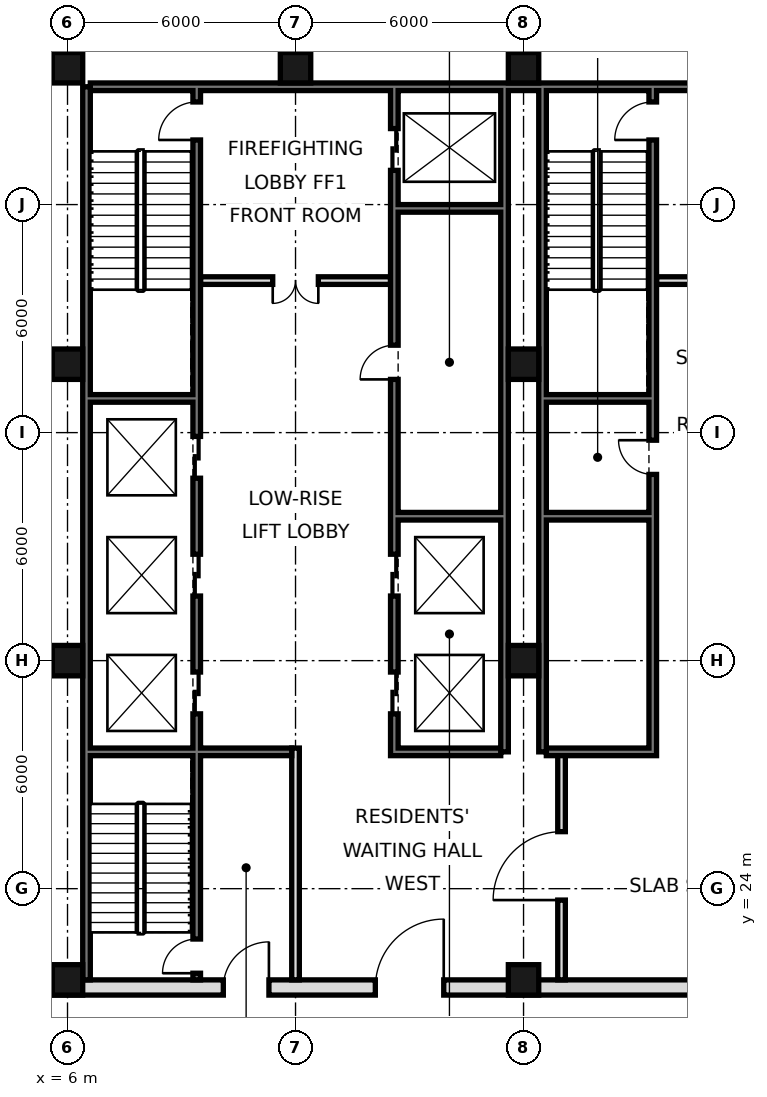
"""IFC4 building model, lengths in metres.
Left out: names, types, materials, properties, quantities, classifications, styles, units other than length and angle.
Written with IfcOpenShell. Run it as: python <this file> out.ifc"""

import sys

from ifc_helpers import new_model, si_unit, direction, frame, frame_2d, origin, origin_2d, place, context, subcontext, project, spatial, rectangle, hollow_rectangle, extrude, element, fill, save


model = new_model("IFC4")
c1 = context("Model", 3, precision=1e-05, world=origin(), true_north=direction((0.0, 1.0)))
c2 = subcontext(c1, "Body", "Model", "MODEL_VIEW")
j1 = project(units=[si_unit("LENGTHUNIT", "METRE"), si_unit("PLANEANGLEUNIT", "RADIAN")], contexts=[c1])
p1 = place(None, origin())
s1 = spatial("IfcSite", under=j1, at=p1, CompositionType="ELEMENT")
p2 = place(p1, origin())
s2 = spatial("IfcBuilding", under=s1, at=p2, CompositionType="ELEMENT")
p3 = place(p2, frame((0.0, 0.0, 25.2)))
s3 = spatial("IfcBuildingStorey", under=s2, at=p3, CompositionType="ELEMENT", Elevation=25.2)
for number, where, z_axis, x_axis in (
    (1, (6.0, 21.6, 0.0), (0.0, 0.0, 1.0), (1.0, 0.0, 0.0)),
    (2, (6.0, 30.0, 0.0), (0.0, 0.0, 1.0), (1.0, 0.0, 0.0)),
    (3, (6.0, 37.8, 0.0), (0.0, 0.0, 1.0), (1.0, 0.0, 0.0)),
    (4, (6.0, 45.6, 0.0), (0.0, 0.0, 1.0), (1.0, 0.0, 0.0)),
    (5, (12.0, 45.6, 0.0), (0.0, 0.0, 1.0), (1.0, 0.0, 0.0)),
    (6, (18.0, 21.6, 0.0), (0.0, 0.0, 1.0), (1.0, 0.0, 0.0)),
    (7, (18.0, 30.0, 0.0), (0.0, 0.0, 1.0), (1.0, 0.0, 0.0)),
    (8, (18.0, 37.8, 0.0), (0.0, 0.0, 1.0), (1.0, 0.0, 0.0)),
    (9, (18.0, 45.6, 0.0), (0.0, 0.0, 1.0), (1.0, 0.0, 0.0)),
):
    element("IfcColumn", number, at=place(p3, frame(where, z_axis=z_axis, x_axis=x_axis)), inside=s3, PredefinedType="COLUMN", context=c2, shape_type="SweptSolid", body=[
        extrude(hollow_rectangle(XDim=0.8, YDim=0.8, WallThickness=0.07, at=origin_2d()), origin(), (0.0, 0.0, 1.0), 4.8),
    ])
p4 = place(p3, frame((6.5, 21.6, 0.0), z_axis=(0.0, 0.0, 1.0), x_axis=(0.0, 1.0, 0.0)))
e10 = element("IfcWall", 10, at=p4, inside=s3, PredefinedType="SOLIDWALL", context=c2, shape_type="SweptSolid", body=[
    extrude(rectangle(XDim=23.5, YDim=0.2, at=frame_2d((11.75, 0.0))), origin(), (0.0, 0.0, 1.0), 4.4),
])
p5 = place(p3, frame((6.6, 45.1, 0.0), z_axis=(0.0, 0.0, 1.0), x_axis=(1.0, 0.0, 0.0)))
e11 = element("IfcWall", 11, at=p5, inside=s3, PredefinedType="SOLIDWALL", context=c2, shape_type="SweptSolid", body=[
    extrude(rectangle(XDim=34.8, YDim=0.2, at=frame_2d((17.4, 0.0))), origin(), (0.0, 0.0, 1.0), 4.4),
])
for number, where, z_axis, x_axis in (
    (12, (17.5, 27.6, 0.0), (0.0, 0.0, 1.0), (0.0, 1.0, 0.0)),
    (13, (18.5, 27.6, 0.0), (0.0, 0.0, 1.0), (0.0, 1.0, 0.0)),
):
    element("IfcWall", number, at=place(p3, frame(where, z_axis=z_axis, x_axis=x_axis)), inside=s3, PredefinedType="SOLIDWALL", context=c2, shape_type="SweptSolid", body=[
        extrude(rectangle(XDim=17.5, YDim=0.2, at=frame_2d((8.75, 0.0))), origin(), (0.0, 0.0, 1.0), 4.4),
    ])
p6 = place(p3, frame((5.6, 21.4, 0.0), z_axis=(0.0, 0.0, 1.0), x_axis=(1.0, 0.0, 0.0)))
e14 = element("IfcWall", 14, at=p6, inside=s3, PredefinedType="SOLIDWALL", context=c2, shape_type="SweptSolid", body=[
    extrude(rectangle(XDim=36.8, YDim=0.4, at=frame_2d((18.4, 0.0))), origin(), (0.0, 0.0, 1.0), 4.4),
])
p7 = place(p6, frame((8.5, 0.0, 0.0)))
e15 = element("IfcOpeningElement", 15, at=p7, cuts=e14, PredefinedType="OPENING", context=c2, shape_type="SweptSolid", body=[
    extrude(rectangle(XDim=1.8, YDim=2.1, at=frame_2d((0.9, 1.05))), frame((0.0, 0.21, 0.0), z_axis=(0.0, -1.0, 0.0), x_axis=(1.0, 0.0, 0.0)), (0.0, 0.0, 1.0), 0.42),
])
p8 = place(p6, frame((17.5, 0.0, 0.0)))
e16 = element("IfcOpeningElement", 16, at=p8, cuts=e14, PredefinedType="OPENING", context=c2, shape_type="SweptSolid", body=[
    extrude(rectangle(XDim=1.8, YDim=2.1, at=frame_2d((0.9, 1.05))), frame((0.0, 0.21, 0.0), z_axis=(0.0, -1.0, 0.0), x_axis=(1.0, 0.0, 0.0)), (0.0, 0.0, 1.0), 0.42),
])
p9 = place(p6, frame((26.5, 0.0, 0.0)))
e17 = element("IfcOpeningElement", 17, at=p9, cuts=e14, PredefinedType="OPENING", context=c2, shape_type="SweptSolid", body=[
    extrude(rectangle(XDim=1.8, YDim=2.1, at=frame_2d((0.9, 1.05))), frame((0.0, 0.21, 0.0), z_axis=(0.0, -1.0, 0.0), x_axis=(1.0, 0.0, 0.0)), (0.0, 0.0, 1.0), 0.42),
])
p10 = place(p6, frame((4.5, 0.0, 0.0)))
e18 = element("IfcOpeningElement", 18, at=p10, cuts=e14, PredefinedType="OPENING", context=c2, shape_type="SweptSolid", body=[
    extrude(rectangle(XDim=1.2, YDim=2.1, at=frame_2d((0.6, 1.05))), frame((0.0, 0.21, 0.0), z_axis=(0.0, -1.0, 0.0), x_axis=(1.0, 0.0, 0.0)), (0.0, 0.0, 1.0), 0.42),
])
p11 = place(p6, frame((31.1, 0.0, 0.0)))
e19 = element("IfcOpeningElement", 19, at=p11, cuts=e14, PredefinedType="OPENING", context=c2, shape_type="SweptSolid", body=[
    extrude(rectangle(XDim=1.2, YDim=2.1, at=frame_2d((0.6, 1.05))), frame((0.0, 0.21, 0.0), z_axis=(0.0, -1.0, 0.0), x_axis=(1.0, 0.0, 0.0)), (0.0, 0.0, 1.0), 0.42),
])
p12 = place(p3, frame((19.0, 21.6, 0.0), z_axis=(0.0, 0.0, 1.0), x_axis=(0.0, 1.0, 0.0)))
e20 = element("IfcWall", 20, at=p12, inside=s3, PredefinedType="PARTITIONING", context=c2, shape_type="SweptSolid", body=[
    extrude(rectangle(XDim=6.0, YDim=0.2, at=frame_2d((3.0, 0.0))), origin(), (0.0, 0.0, 1.0), 4.4),
])
p13 = place(p12, frame((2.1, 0.0, 0.0)))
e21 = element("IfcOpeningElement", 21, at=p13, cuts=e20, PredefinedType="OPENING", context=c2, shape_type="SweptSolid", body=[
    extrude(rectangle(XDim=1.8, YDim=2.1, at=frame_2d((0.9, 1.05))), frame((0.0, 0.11, 0.0), z_axis=(0.0, -1.0, 0.0), x_axis=(1.0, 0.0, 0.0)), (0.0, 0.0, 1.0), 0.22),
])
p14 = place(p3, frame((12.0, 21.6, 0.0), z_axis=(0.0, 0.0, 1.0), x_axis=(0.0, 1.0, 0.0)))
e22 = element("IfcWall", 22, at=p14, inside=s3, PredefinedType="PARTITIONING", context=c2, shape_type="SweptSolid", body=[
    extrude(rectangle(XDim=6.1, YDim=0.2, at=frame_2d((3.05, 0.0))), origin(), (0.0, 0.0, 1.0), 4.4),
])
p15 = place(p3, frame((14.6, 27.5, 0.0), z_axis=(0.0, 0.0, 1.0), x_axis=(0.0, 1.0, 0.0)))
e23 = element("IfcWall", 23, at=p15, inside=s3, PredefinedType="SOLIDWALL", context=c2, shape_type="SweptSolid", body=[
    extrude(rectangle(XDim=17.5, YDim=0.2, at=frame_2d((8.75, 0.0))), origin(), (0.0, 0.0, 1.0), 4.4),
])
p16 = place(p15, frame((1.1, 0.0, 0.0)))
e24 = element("IfcOpeningElement", 24, at=p16, cuts=e23, PredefinedType="OPENING", context=c2, shape_type="SweptSolid", body=[
    extrude(rectangle(XDim=1.1, YDim=2.1, at=frame_2d((0.55, 1.05))), frame((0.0, 0.11, 0.0), z_axis=(0.0, -1.0, 0.0), x_axis=(1.0, 0.0, 0.0)), (0.0, 0.0, 1.0), 0.22),
])
p17 = place(p15, frame((4.2, 0.0, 0.0)))
e25 = element("IfcOpeningElement", 25, at=p17, cuts=e23, PredefinedType="OPENING", context=c2, shape_type="SweptSolid", body=[
    extrude(rectangle(XDim=1.1, YDim=2.1, at=frame_2d((0.55, 1.05))), frame((0.0, 0.11, 0.0), z_axis=(0.0, -1.0, 0.0), x_axis=(1.0, 0.0, 0.0)), (0.0, 0.0, 1.0), 0.22),
])
p18 = place(p15, frame((15.4, 0.0, 0.0)))
e26 = element("IfcOpeningElement", 26, at=p18, cuts=e23, PredefinedType="OPENING", context=c2, shape_type="SweptSolid", body=[
    extrude(rectangle(XDim=1.1, YDim=2.1, at=frame_2d((0.55, 1.05))), frame((0.0, 0.11, 0.0), z_axis=(0.0, -1.0, 0.0), x_axis=(1.0, 0.0, 0.0)), (0.0, 0.0, 1.0), 0.22),
])
p19 = place(p15, frame((9.9, 0.0, 0.0)))
e27 = element("IfcOpeningElement", 27, at=p19, cuts=e23, PredefinedType="OPENING", context=c2, shape_type="SweptSolid", body=[
    extrude(rectangle(XDim=0.9, YDim=2.1, at=frame_2d((0.45, 1.05))), frame((0.0, 0.11, 0.0), z_axis=(0.0, -1.0, 0.0), x_axis=(1.0, 0.0, 0.0)), (0.0, 0.0, 1.0), 0.22),
])
p20 = place(p3, frame((21.4, 27.5, 0.0), z_axis=(0.0, 0.0, 1.0), x_axis=(0.0, 1.0, 0.0)))
e28 = element("IfcWall", 28, at=p20, inside=s3, PredefinedType="SOLIDWALL", context=c2, shape_type="SweptSolid", body=[
    extrude(rectangle(XDim=17.5, YDim=0.2, at=frame_2d((8.75, 0.0))), origin(), (0.0, 0.0, 1.0), 4.4),
])
p21 = place(p20, frame((16.2, 0.0, 0.0)))
e29 = element("IfcOpeningElement", 29, at=p21, cuts=e28, PredefinedType="OPENING", context=c2, shape_type="SweptSolid", body=[
    extrude(rectangle(XDim=1.0, YDim=2.1, at=frame_2d((0.5, 1.05))), frame((0.0, 0.11, 0.0), z_axis=(0.0, -1.0, 0.0), x_axis=(1.0, 0.0, 0.0)), (0.0, 0.0, 1.0), 0.22),
])
p22 = place(p20, frame((7.4, 0.0, 0.0)))
e30 = element("IfcOpeningElement", 30, at=p22, cuts=e28, PredefinedType="OPENING", context=c2, shape_type="SweptSolid", body=[
    extrude(rectangle(XDim=0.9, YDim=2.1, at=frame_2d((0.45, 1.05))), frame((0.0, 0.11, 0.0), z_axis=(0.0, -1.0, 0.0), x_axis=(1.0, 0.0, 0.0)), (0.0, 0.0, 1.0), 0.22),
])
p23 = place(p3, frame((9.4, 21.6, 0.0), z_axis=(0.0, 0.0, 1.0), x_axis=(0.0, 1.0, 0.0)))
e31 = element("IfcWall", 31, at=p23, inside=s3, PredefinedType="SOLIDWALL", context=c2, shape_type="SweptSolid", body=[
    extrude(rectangle(XDim=23.4, YDim=0.2, at=frame_2d((11.7, 0.0))), origin(), (0.0, 0.0, 1.0), 4.4),
])
p24 = place(p23, frame((7.0, 0.0, 0.0)))
e32 = element("IfcOpeningElement", 32, at=p24, cuts=e31, PredefinedType="OPENING", context=c2, shape_type="SweptSolid", body=[
    extrude(rectangle(XDim=1.1, YDim=2.1, at=frame_2d((0.55, 1.05))), frame((0.0, 0.11, 0.0), z_axis=(0.0, -1.0, 0.0), x_axis=(1.0, 0.0, 0.0)), (0.0, 0.0, 1.0), 0.22),
])
p25 = place(p23, frame((10.1, 0.0, 0.0)))
e33 = element("IfcOpeningElement", 33, at=p25, cuts=e31, PredefinedType="OPENING", context=c2, shape_type="SweptSolid", body=[
    extrude(rectangle(XDim=1.1, YDim=2.1, at=frame_2d((0.55, 1.05))), frame((0.0, 0.11, 0.0), z_axis=(0.0, -1.0, 0.0), x_axis=(1.0, 0.0, 0.0)), (0.0, 0.0, 1.0), 0.22),
])
p26 = place(p23, frame((13.2, 0.0, 0.0)))
e34 = element("IfcOpeningElement", 34, at=p26, cuts=e31, PredefinedType="OPENING", context=c2, shape_type="SweptSolid", body=[
    extrude(rectangle(XDim=1.1, YDim=2.1, at=frame_2d((0.55, 1.05))), frame((0.0, 0.11, 0.0), z_axis=(0.0, -1.0, 0.0), x_axis=(1.0, 0.0, 0.0)), (0.0, 0.0, 1.0), 0.22),
])
p27 = place(p23, frame((22.1, 0.0, 0.0)))
e35 = element("IfcOpeningElement", 35, at=p27, cuts=e31, PredefinedType="OPENING", context=c2, shape_type="SweptSolid", body=[
    extrude(rectangle(XDim=1.0, YDim=2.1, at=frame_2d((0.5, 1.05))), frame((0.0, 0.11, 0.0), z_axis=(0.0, -1.0, 0.0), x_axis=(1.0, 0.0, 0.0)), (0.0, 0.0, 1.0), 0.22),
])
p28 = place(p23, frame((0.175, 0.0, 0.0)))
e36 = element("IfcOpeningElement", 36, at=p28, cuts=e31, PredefinedType="OPENING", context=c2, shape_type="SweptSolid", body=[
    extrude(rectangle(XDim=0.9, YDim=2.1, at=frame_2d((0.45, 1.05))), frame((0.0, 0.11, 0.0), z_axis=(0.0, -1.0, 0.0), x_axis=(1.0, 0.0, 0.0)), (0.0, 0.0, 1.0), 0.22),
])
for number, where, z_axis, x_axis in (
    (37, (14.7, 27.6, 0.0), (0.0, 0.0, 1.0), (1.0, 0.0, 0.0)),
    (38, (18.6, 27.6, 0.0), (0.0, 0.0, 1.0), (1.0, 0.0, 0.0)),
):
    element("IfcWall", number, at=place(p3, frame(where, z_axis=z_axis, x_axis=x_axis)), inside=s3, PredefinedType="SOLIDWALL", context=c2, shape_type="SweptSolid", body=[
        extrude(rectangle(XDim=2.7, YDim=0.2, at=frame_2d((1.35, 0.0))), origin(), (0.0, 0.0, 1.0), 4.4),
    ])
p29 = place(p3, frame((6.6, 27.6, 0.0), z_axis=(0.0, 0.0, 1.0), x_axis=(1.0, 0.0, 0.0)))
e39 = element("IfcWall", 39, at=p29, inside=s3, PredefinedType="SOLIDWALL", context=c2, shape_type="SweptSolid", body=[
    extrude(rectangle(XDim=5.3, YDim=0.2, at=frame_2d((2.65, 0.0))), origin(), (0.0, 0.0, 1.0), 4.4),
])
for number, where, z_axis, x_axis in (
    (40, (14.7, 33.8, 0.0), (0.0, 0.0, 1.0), (1.0, 0.0, 0.0)),
    (41, (18.6, 33.8, 0.0), (0.0, 0.0, 1.0), (1.0, 0.0, 0.0)),
    (42, (18.6, 36.9, 0.0), (0.0, 0.0, 1.0), (1.0, 0.0, 0.0)),
    (43, (6.6, 36.9, 0.0), (0.0, 0.0, 1.0), (1.0, 0.0, 0.0)),
):
    element("IfcWall", number, at=place(p3, frame(where, z_axis=z_axis, x_axis=x_axis)), inside=s3, PredefinedType="SOLIDWALL", context=c2, shape_type="SweptSolid", body=[
        extrude(rectangle(XDim=2.7, YDim=0.2, at=frame_2d((1.35, 0.0))), origin(), (0.0, 0.0, 1.0), 4.4),
    ])
p30 = place(p3, frame((21.5, 40.0, 0.0), z_axis=(0.0, 0.0, 1.0), x_axis=(1.0, 0.0, 0.0)))
e44 = element("IfcWall", 44, at=p30, inside=s3, PredefinedType="PARTITIONING", context=c2, shape_type="SweptSolid", body=[
    extrude(rectangle(XDim=5.0, YDim=0.2, at=frame_2d((2.5, 0.0))), origin(), (0.0, 0.0, 1.0), 4.4),
])
p31 = place(p30, frame((1.9, 0.0, 0.0)))
e45 = element("IfcOpeningElement", 45, at=p31, cuts=e44, PredefinedType="OPENING", context=c2, shape_type="SweptSolid", body=[
    extrude(rectangle(XDim=1.2, YDim=2.1, at=frame_2d((0.6, 1.05))), frame((0.0, 0.11, 0.0), z_axis=(0.0, -1.0, 0.0), x_axis=(1.0, 0.0, 0.0)), (0.0, 0.0, 1.0), 0.22),
])
p32 = place(p3, frame((9.5, 40.0, 0.0), z_axis=(0.0, 0.0, 1.0), x_axis=(1.0, 0.0, 0.0)))
e46 = element("IfcWall", 46, at=p32, inside=s3, PredefinedType="PARTITIONING", context=c2, shape_type="SweptSolid", body=[
    extrude(rectangle(XDim=5.0, YDim=0.2, at=frame_2d((2.5, 0.0))), origin(), (0.0, 0.0, 1.0), 4.4),
])
p33 = place(p32, frame((1.9, 0.0, 0.0)))
e47 = element("IfcOpeningElement", 47, at=p33, cuts=e46, PredefinedType="OPENING", context=c2, shape_type="SweptSolid", body=[
    extrude(rectangle(XDim=1.2, YDim=2.1, at=frame_2d((0.6, 1.05))), frame((0.0, 0.11, 0.0), z_axis=(0.0, -1.0, 0.0), x_axis=(1.0, 0.0, 0.0)), (0.0, 0.0, 1.0), 0.22),
])
p34 = place(p3, frame((14.7, 41.9, 0.0), z_axis=(0.0, 0.0, 1.0), x_axis=(1.0, 0.0, 0.0)))
e48 = element("IfcWall", 48, at=p34, inside=s3, PredefinedType="SOLIDWALL", context=c2, shape_type="SweptSolid", body=[
    extrude(rectangle(XDim=2.7, YDim=0.2, at=frame_2d((1.35, 0.0))), origin(), (0.0, 0.0, 1.0), 4.4),
])
p35 = place(p7, frame((1.8, 0.0, 0.0), z_axis=(0.0, 0.0, 1.0), x_axis=(-1.0, 0.0, 0.0)))
e49 = element("IfcDoor", 49, at=p35, inside=s3, OperationType="SINGLE_SWING_LEFT", PredefinedType="DOOR", context=c2, shape_type="SweptSolid", body=[
    extrude(rectangle(XDim=1.8, YDim=2.1, at=frame_2d((0.9, 1.05))), frame((0.0, 0.025, 0.0), z_axis=(0.0, -1.0, 0.0), x_axis=(1.0, 0.0, 0.0)), (0.0, 0.0, 1.0), 0.05),
])
fill(e15, e49)
p36 = place(p13, origin())
e50 = element("IfcDoor", 50, at=p36, inside=s3, OperationType="SINGLE_SWING_LEFT", PredefinedType="DOOR", context=c2, shape_type="SweptSolid", body=[
    extrude(rectangle(XDim=1.8, YDim=2.1, at=frame_2d((0.9, 1.05))), frame((0.0, 0.025, 0.0), z_axis=(0.0, -1.0, 0.0), x_axis=(1.0, 0.0, 0.0)), (0.0, 0.0, 1.0), 0.05),
])
fill(e21, e50)
p37 = place(p10, frame((1.2, 0.0, 0.0), z_axis=(0.0, 0.0, 1.0), x_axis=(-1.0, 0.0, 0.0)))
e51 = element("IfcDoor", 51, at=p37, inside=s3, OperationType="SINGLE_SWING_LEFT", PredefinedType="DOOR", context=c2, shape_type="SweptSolid", body=[
    extrude(rectangle(XDim=1.2, YDim=2.1, at=frame_2d((0.6, 1.05))), frame((0.0, 0.025, 0.0), z_axis=(0.0, -1.0, 0.0), x_axis=(1.0, 0.0, 0.0)), (0.0, 0.0, 1.0), 0.05),
])
fill(e18, e51)
p38 = place(p33, frame((1.2, 0.0, 0.0), z_axis=(0.0, 0.0, 1.0), x_axis=(-1.0, 0.0, 0.0)))
e52 = element("IfcDoor", 52, at=p38, inside=s3, OperationType="DOUBLE_DOOR_SINGLE_SWING", PredefinedType="DOOR", context=c2, shape_type="SweptSolid", body=[
    extrude(rectangle(XDim=1.2, YDim=2.1, at=frame_2d((0.6, 1.05))), frame((0.0, 0.025, 0.0), z_axis=(0.0, -1.0, 0.0), x_axis=(1.0, 0.0, 0.0)), (0.0, 0.0, 1.0), 0.05),
])
fill(e47, e52)
p39 = place(p16, origin())
e53 = element("IfcDoor", 53, at=p39, inside=s3, OperationType="DOUBLE_DOOR_SLIDING", PredefinedType="DOOR", context=c2, shape_type="SweptSolid", body=[
    extrude(rectangle(XDim=1.1, YDim=2.1, at=frame_2d((0.55, 1.05))), frame((0.0, 0.025, 0.0), z_axis=(0.0, -1.0, 0.0), x_axis=(1.0, 0.0, 0.0)), (0.0, 0.0, 1.0), 0.05),
])
fill(e24, e53)
p40 = place(p17, origin())
e54 = element("IfcDoor", 54, at=p40, inside=s3, OperationType="DOUBLE_DOOR_SLIDING", PredefinedType="DOOR", context=c2, shape_type="SweptSolid", body=[
    extrude(rectangle(XDim=1.1, YDim=2.1, at=frame_2d((0.55, 1.05))), frame((0.0, 0.025, 0.0), z_axis=(0.0, -1.0, 0.0), x_axis=(1.0, 0.0, 0.0)), (0.0, 0.0, 1.0), 0.05),
])
fill(e25, e54)
p41 = place(p18, origin())
e55 = element("IfcDoor", 55, at=p41, inside=s3, OperationType="DOUBLE_DOOR_SLIDING", PredefinedType="DOOR", context=c2, shape_type="SweptSolid", body=[
    extrude(rectangle(XDim=1.1, YDim=2.1, at=frame_2d((0.55, 1.05))), frame((0.0, 0.025, 0.0), z_axis=(0.0, -1.0, 0.0), x_axis=(1.0, 0.0, 0.0)), (0.0, 0.0, 1.0), 0.05),
])
fill(e26, e55)
p42 = place(p24, origin())
e56 = element("IfcDoor", 56, at=p42, inside=s3, OperationType="DOUBLE_DOOR_SLIDING", PredefinedType="DOOR", context=c2, shape_type="SweptSolid", body=[
    extrude(rectangle(XDim=1.1, YDim=2.1, at=frame_2d((0.55, 1.05))), frame((0.0, 0.025, 0.0), z_axis=(0.0, -1.0, 0.0), x_axis=(1.0, 0.0, 0.0)), (0.0, 0.0, 1.0), 0.05),
])
fill(e32, e56)
p43 = place(p25, origin())
e57 = element("IfcDoor", 57, at=p43, inside=s3, OperationType="DOUBLE_DOOR_SLIDING", PredefinedType="DOOR", context=c2, shape_type="SweptSolid", body=[
    extrude(rectangle(XDim=1.1, YDim=2.1, at=frame_2d((0.55, 1.05))), frame((0.0, 0.025, 0.0), z_axis=(0.0, -1.0, 0.0), x_axis=(1.0, 0.0, 0.0)), (0.0, 0.0, 1.0), 0.05),
])
fill(e33, e57)
p44 = place(p26, origin())
e58 = element("IfcDoor", 58, at=p44, inside=s3, OperationType="DOUBLE_DOOR_SLIDING", PredefinedType="DOOR", context=c2, shape_type="SweptSolid", body=[
    extrude(rectangle(XDim=1.1, YDim=2.1, at=frame_2d((0.55, 1.05))), frame((0.0, 0.025, 0.0), z_axis=(0.0, -1.0, 0.0), x_axis=(1.0, 0.0, 0.0)), (0.0, 0.0, 1.0), 0.05),
])
fill(e34, e58)
p45 = place(p27, origin())
e59 = element("IfcDoor", 59, at=p45, inside=s3, OperationType="SINGLE_SWING_LEFT", PredefinedType="DOOR", context=c2, shape_type="SweptSolid", body=[
    extrude(rectangle(XDim=1.0, YDim=2.1, at=frame_2d((0.5, 1.05))), frame((0.0, 0.025, 0.0), z_axis=(0.0, -1.0, 0.0), x_axis=(1.0, 0.0, 0.0)), (0.0, 0.0, 1.0), 0.05),
])
fill(e35, e59)
p46 = place(p21, origin())
e60 = element("IfcDoor", 60, at=p46, inside=s3, OperationType="SINGLE_SWING_LEFT", PredefinedType="DOOR", context=c2, shape_type="SweptSolid", body=[
    extrude(rectangle(XDim=1.0, YDim=2.1, at=frame_2d((0.5, 1.05))), frame((0.0, 0.025, 0.0), z_axis=(0.0, -1.0, 0.0), x_axis=(1.0, 0.0, 0.0)), (0.0, 0.0, 1.0), 0.05),
])
fill(e29, e60)
p47 = place(p28, origin())
e61 = element("IfcDoor", 61, at=p47, inside=s3, OperationType="SINGLE_SWING_LEFT", PredefinedType="DOOR", context=c2, shape_type="SweptSolid", body=[
    extrude(rectangle(XDim=0.9, YDim=2.1, at=frame_2d((0.45, 1.05))), frame((0.0, 0.025, 0.0), z_axis=(0.0, -1.0, 0.0), x_axis=(1.0, 0.0, 0.0)), (0.0, 0.0, 1.0), 0.05),
])
fill(e36, e61)
p48 = place(p19, origin())
e62 = element("IfcDoor", 62, at=p48, inside=s3, OperationType="SINGLE_SWING_LEFT", PredefinedType="DOOR", context=c2, shape_type="SweptSolid", body=[
    extrude(rectangle(XDim=0.9, YDim=2.1, at=frame_2d((0.45, 1.05))), frame((0.0, 0.025, 0.0), z_axis=(0.0, -1.0, 0.0), x_axis=(1.0, 0.0, 0.0)), (0.0, 0.0, 1.0), 0.05),
])
fill(e27, e62)
p49 = place(p22, frame((0.9, 0.0, 0.0), z_axis=(0.0, 0.0, 1.0), x_axis=(-1.0, 0.0, 0.0)))
e63 = element("IfcDoor", 63, at=p49, inside=s3, OperationType="SINGLE_SWING_LEFT", PredefinedType="DOOR", context=c2, shape_type="SweptSolid", body=[
    extrude(rectangle(XDim=0.9, YDim=2.1, at=frame_2d((0.45, 1.05))), frame((0.0, 0.025, 0.0), z_axis=(0.0, -1.0, 0.0), x_axis=(1.0, 0.0, 0.0)), (0.0, 0.0, 1.0), 0.05),
])
fill(e30, e63)
save(model, sys.argv[1])
